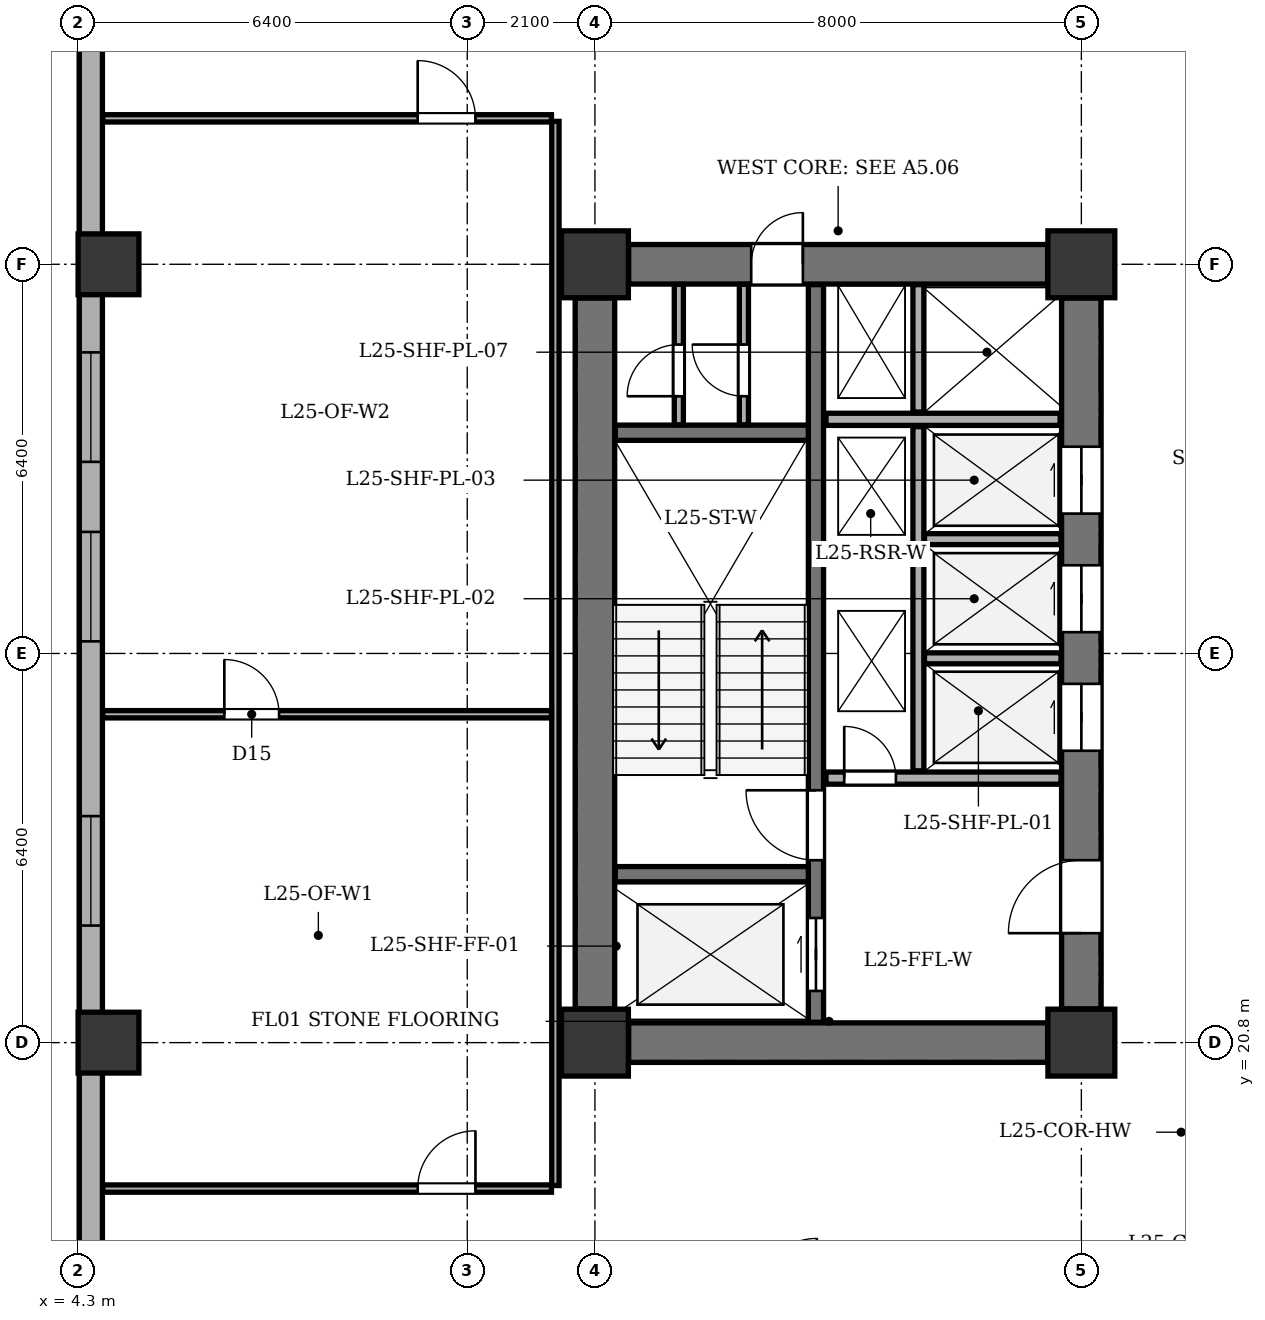
"""IFC4 building model, lengths in metres.
Left out: names, types, materials, properties, quantities, classifications, styles, units other than length and angle.
Written with IfcOpenShell. Run it as: python <this file> out.ifc"""

import sys

from ifc_helpers import new_model, si_unit, direction, frame, frame_2d, origin, origin_2d, place, context, subcontext, project, spatial, rectangle, extrude, element, fill, save


model = new_model("IFC4")
c1 = context("Model", 3, precision=1e-05, world=origin(), true_north=direction((0.0, 1.0)))
c2 = subcontext(c1, "Body", "Model", "MODEL_VIEW")
j1 = project(units=[si_unit("LENGTHUNIT", "METRE"), si_unit("PLANEANGLEUNIT", "RADIAN")], contexts=[c1])
p1 = place(None, origin())
s1 = spatial("IfcSite", under=j1, at=p1, CompositionType="ELEMENT")
p2 = place(p1, origin())
s2 = spatial("IfcBuilding", under=s1, at=p2, CompositionType="ELEMENT")
p3 = place(p2, frame((0.0, 0.0, 102.3)))
s3 = spatial("IfcBuildingStorey", under=s2, at=p3, CompositionType="ELEMENT", Elevation=102.3)
for number, where, z_axis, x_axis in (
    (1, (12.8, 20.8, 0.0), (0.0, 0.0, 1.0), (1.0, 0.0, 0.0)),
    (2, (20.8, 20.8, 0.0), (0.0, 0.0, 1.0), (1.0, 0.0, 0.0)),
    (3, (12.8, 33.6, 0.0), (0.0, 0.0, 1.0), (1.0, 0.0, 0.0)),
    (4, (20.8, 33.6, 0.0), (0.0, 0.0, 1.0), (1.0, 0.0, 0.0)),
):
    element("IfcColumn", number, at=place(p3, frame(where, z_axis=z_axis, x_axis=x_axis)), inside=s3, PredefinedType="COLUMN", context=c2, shape_type="SweptSolid", body=[
        extrude(rectangle(XDim=1.1, YDim=1.1, at=origin_2d()), origin(), (0.0, 0.0, 1.0), 3.9),
    ])
for number, where, z_axis, x_axis in (
    (5, (4.8, 20.8, 0.0), (0.0, 0.0, 1.0), (1.0, 0.0, 0.0)),
    (6, (4.8, 33.6, 0.0), (0.0, 0.0, 1.0), (1.0, 0.0, 0.0)),
):
    element("IfcColumn", number, at=place(p3, frame(where, z_axis=z_axis, x_axis=x_axis)), inside=s3, PredefinedType="COLUMN", context=c2, shape_type="SweptSolid", body=[
        extrude(rectangle(XDim=1.0, YDim=1.0, at=origin_2d()), origin(), (0.0, 0.0, 1.0), 3.9),
    ])
p4 = place(p3, frame((4.51, 12.9, 0.0), z_axis=(0.0, 0.0, 1.0), x_axis=(0.0, 1.0, 0.0)))
e7 = element("IfcWall", 7, at=p4, inside=s3, PredefinedType="STANDARD", context=c2, shape_type="SweptSolid", body=[
    extrude(rectangle(XDim=35.0, YDim=0.38, at=frame_2d((17.5, 0.0))), origin(), (0.0, 0.0, 1.0), 3.135),
])
p5 = place(p4, frame((2.025, 0.0, 0.8)))
e8 = element("IfcOpeningElement", 8, at=p5, cuts=e7, PredefinedType="OPENING", context=c2, shape_type="SweptSolid", body=[
    extrude(rectangle(XDim=1.8, YDim=1.9, at=frame_2d((0.9, 0.95))), frame((0.0, 0.2, 0.0), z_axis=(0.0, -1.0, 0.0), x_axis=(1.0, 0.0, 0.0)), (0.0, 0.0, 1.0), 0.4),
])
p6 = place(p4, frame((9.825, 0.0, 0.8)))
e9 = element("IfcOpeningElement", 9, at=p6, cuts=e7, PredefinedType="OPENING", context=c2, shape_type="SweptSolid", body=[
    extrude(rectangle(XDim=1.8, YDim=1.9, at=frame_2d((0.9, 0.95))), frame((0.0, 0.2, 0.0), z_axis=(0.0, -1.0, 0.0), x_axis=(1.0, 0.0, 0.0)), (0.0, 0.0, 1.0), 0.4),
])
p7 = place(p4, frame((14.499, 0.0, 0.8)))
e10 = element("IfcOpeningElement", 10, at=p7, cuts=e7, PredefinedType="OPENING", context=c2, shape_type="SweptSolid", body=[
    extrude(rectangle(XDim=1.8, YDim=1.9, at=frame_2d((0.9, 0.95))), frame((0.0, 0.2, 0.0), z_axis=(0.0, -1.0, 0.0), x_axis=(1.0, 0.0, 0.0)), (0.0, 0.0, 1.0), 0.4),
])
p8 = place(p4, frame((17.451, 0.0, 0.8)))
e11 = element("IfcOpeningElement", 11, at=p8, cuts=e7, PredefinedType="OPENING", context=c2, shape_type="SweptSolid", body=[
    extrude(rectangle(XDim=1.8, YDim=1.9, at=frame_2d((0.9, 0.95))), frame((0.0, 0.2, 0.0), z_axis=(0.0, -1.0, 0.0), x_axis=(1.0, 0.0, 0.0)), (0.0, 0.0, 1.0), 0.4),
])
p9 = place(p4, frame((25.443, 0.0, 0.8)))
e12 = element("IfcOpeningElement", 12, at=p9, cuts=e7, PredefinedType="OPENING", context=c2, shape_type="SweptSolid", body=[
    extrude(rectangle(XDim=1.8, YDim=1.9, at=frame_2d((0.9, 0.95))), frame((0.0, 0.2, 0.0), z_axis=(0.0, -1.0, 0.0), x_axis=(1.0, 0.0, 0.0)), (0.0, 0.0, 1.0), 0.4),
])
p10 = place(p4, frame((30.207, 0.0, 0.8)))
e13 = element("IfcOpeningElement", 13, at=p10, cuts=e7, PredefinedType="OPENING", context=c2, shape_type="SweptSolid", body=[
    extrude(rectangle(XDim=2.4, YDim=1.9, at=frame_2d((1.2, 0.95))), frame((0.0, 0.2, 0.0), z_axis=(0.0, -1.0, 0.0), x_axis=(1.0, 0.0, 0.0)), (0.0, 0.0, 1.0), 0.4),
])
p11 = place(p3, frame((12.8, 21.355, 0.0), z_axis=(0.0, 0.0, 1.0), x_axis=(0.0, 1.0, 0.0)))
e14 = element("IfcWall", 14, at=p11, inside=s3, PredefinedType="SHEAR", context=c2, shape_type="SweptSolid", body=[
    extrude(rectangle(XDim=11.69, YDim=0.65, at=frame_2d((5.845, 0.0))), origin(), (0.0, 0.0, 1.0), 3.6),
])
p12 = place(p3, frame((13.355, 20.8, 0.0), z_axis=(0.0, 0.0, 1.0), x_axis=(1.0, 0.0, 0.0)))
e15 = element("IfcWall", 15, at=p12, inside=s3, PredefinedType="SHEAR", context=c2, shape_type="SweptSolid", body=[
    extrude(rectangle(XDim=6.89, YDim=0.65, at=frame_2d((3.445, 0.0))), origin(), (0.0, 0.0, 1.0), 3.6),
])
p13 = place(p3, frame((13.355, 33.6, 0.0), z_axis=(0.0, 0.0, 1.0), x_axis=(1.0, 0.0, 0.0)))
e16 = element("IfcWall", 16, at=p13, inside=s3, PredefinedType="SHEAR", context=c2, shape_type="SweptSolid", body=[
    extrude(rectangle(XDim=6.89, YDim=0.65, at=frame_2d((3.445, 0.0))), origin(), (0.0, 0.0, 1.0), 3.6),
])
p14 = place(p13, frame((2.015, 0.0, 0.0)))
e17 = element("IfcOpeningElement", 17, at=p14, cuts=e16, PredefinedType="OPENING", context=c2, shape_type="SweptSolid", body=[
    extrude(rectangle(XDim=0.85, YDim=2.02, at=frame_2d((0.425, 1.01))), frame((0.0, 0.335, 0.0), z_axis=(0.0, -1.0, 0.0), x_axis=(1.0, 0.0, 0.0)), (0.0, 0.0, 1.0), 0.67),
])
p15 = place(p3, frame((20.8, 21.355, 0.0), z_axis=(0.0, 0.0, 1.0), x_axis=(0.0, 1.0, 0.0)))
e18 = element("IfcWall", 18, at=p15, inside=s3, PredefinedType="SHEAR", context=c2, shape_type="SweptSolid", body=[
    extrude(rectangle(XDim=11.69, YDim=0.65, at=frame_2d((5.845, 0.0))), origin(), (0.0, 0.0, 1.0), 3.6),
])
p16 = place(p15, frame((1.245, 0.0, 0.0)))
e19 = element("IfcOpeningElement", 19, at=p16, cuts=e18, PredefinedType="OPENING", context=c2, shape_type="SweptSolid", body=[
    extrude(rectangle(XDim=1.2, YDim=2.15, at=frame_2d((0.6, 1.075))), frame((0.0, 0.335, 0.0), z_axis=(0.0, -1.0, 0.0), x_axis=(1.0, 0.0, 0.0)), (0.0, 0.0, 1.0), 0.67),
])
p17 = place(p15, frame((4.245, 0.0, 0.0)))
e20 = element("IfcOpeningElement", 20, at=p17, cuts=e18, PredefinedType="OPENING", context=c2, shape_type="SweptSolid", body=[
    extrude(rectangle(XDim=1.1, YDim=2.1, at=frame_2d((0.55, 1.05))), frame((0.0, 0.335, 0.0), z_axis=(0.0, -1.0, 0.0), x_axis=(1.0, 0.0, 0.0)), (0.0, 0.0, 1.0), 0.67),
])
p18 = place(p15, frame((6.195, 0.0, 0.0)))
e21 = element("IfcOpeningElement", 21, at=p18, cuts=e18, PredefinedType="OPENING", context=c2, shape_type="SweptSolid", body=[
    extrude(rectangle(XDim=1.1, YDim=2.1, at=frame_2d((0.55, 1.05))), frame((0.0, 0.335, 0.0), z_axis=(0.0, -1.0, 0.0), x_axis=(1.0, 0.0, 0.0)), (0.0, 0.0, 1.0), 0.67),
])
p19 = place(p15, frame((8.145, 0.0, 0.0)))
e22 = element("IfcOpeningElement", 22, at=p19, cuts=e18, PredefinedType="OPENING", context=c2, shape_type="SweptSolid", body=[
    extrude(rectangle(XDim=1.1, YDim=2.1, at=frame_2d((0.55, 1.05))), frame((0.0, 0.335, 0.0), z_axis=(0.0, -1.0, 0.0), x_axis=(1.0, 0.0, 0.0)), (0.0, 0.0, 1.0), 0.67),
])
p20 = place(p3, frame((16.435, 21.135, 0.0), z_axis=(0.0, 0.0, 1.0), x_axis=(0.0, 1.0, 0.0)))
e23 = element("IfcWall", 23, at=p20, inside=s3, PredefinedType="SHEAR", context=c2, shape_type="SweptSolid", body=[
    extrude(rectangle(XDim=12.13, YDim=0.25, at=frame_2d((6.065, 0.0))), origin(), (0.0, 0.0, 1.0), 3.6),
])
p21 = place(p20, frame((0.515, 0.0, 0.0)))
e24 = element("IfcOpeningElement", 24, at=p21, cuts=e23, PredefinedType="OPENING", context=c2, shape_type="SweptSolid", body=[
    extrude(rectangle(XDim=1.2, YDim=2.15, at=frame_2d((0.6, 1.075))), frame((0.0, 0.135, 0.0), z_axis=(0.0, -1.0, 0.0), x_axis=(1.0, 0.0, 0.0)), (0.0, 0.0, 1.0), 0.27),
])
p22 = place(p20, frame((2.665, 0.0, 0.0)))
e25 = element("IfcOpeningElement", 25, at=p22, cuts=e23, PredefinedType="OPENING", context=c2, shape_type="SweptSolid", body=[
    extrude(rectangle(XDim=1.15, YDim=2.15, at=frame_2d((0.575, 1.075))), frame((0.0, 0.135, 0.0), z_axis=(0.0, -1.0, 0.0), x_axis=(1.0, 0.0, 0.0)), (0.0, 0.0, 1.0), 0.27),
])
for number, where, z_axis, x_axis in (
    (26, (13.135, 23.57, 0.0), (0.0, 0.0, 1.0), (1.0, 0.0, 0.0)),
    (27, (13.135, 30.83, 0.0), (0.0, 0.0, 1.0), (1.0, 0.0, 0.0)),
):
    element("IfcWall", number, at=place(p3, frame(where, z_axis=z_axis, x_axis=x_axis)), inside=s3, PredefinedType="SHEAR", context=c2, shape_type="SweptSolid", body=[
        extrude(rectangle(XDim=3.175, YDim=0.25, at=frame_2d((1.587, 0.0))), origin(), (0.0, 0.0, 1.0), 3.6),
    ])
p23 = place(p3, frame((16.6, 25.15, 0.0), z_axis=(0.0, 0.0, 1.0), x_axis=(1.0, 0.0, 0.0)))
e28 = element("IfcWall", 28, at=p23, inside=s3, PredefinedType="SOLIDWALL", context=c2, shape_type="SweptSolid", body=[
    extrude(rectangle(XDim=3.865, YDim=0.2, at=frame_2d((1.933, 0.0))), origin(), (0.0, 0.0, 1.0), 3.6),
])
p24 = place(p23, frame((0.3, 0.0, 0.0)))
e29 = element("IfcOpeningElement", 29, at=p24, cuts=e28, PredefinedType="OPENING", context=c2, shape_type="SweptSolid", body=[
    extrude(rectangle(XDim=0.85, YDim=2.02, at=frame_2d((0.425, 1.01))), frame((0.0, 0.11, 0.0), z_axis=(0.0, -1.0, 0.0), x_axis=(1.0, 0.0, 0.0)), (0.0, 0.0, 1.0), 0.22),
])
p25 = place(p3, frame((16.6, 31.05, 0.0), z_axis=(0.0, 0.0, 1.0), x_axis=(1.0, 0.0, 0.0)))
e30 = element("IfcWall", 30, at=p25, inside=s3, PredefinedType="SOLIDWALL", context=c2, shape_type="SweptSolid", body=[
    extrude(rectangle(XDim=3.85, YDim=0.2, at=frame_2d((1.925, 0.0))), origin(), (0.0, 0.0, 1.0), 3.6),
])
p26 = place(p3, frame((18.12, 25.27, 0.0), z_axis=(0.0, 0.0, 1.0), x_axis=(0.0, 1.0, 0.0)))
e31 = element("IfcWall", 31, at=p26, inside=s3, PredefinedType="PARTITIONING", context=c2, shape_type="SweptSolid", body=[
    extrude(rectangle(XDim=5.66, YDim=0.18, at=frame_2d((2.83, 0.0))), origin(), (0.0, 0.0, 1.0), 3.6),
])
p27 = place(p3, frame((18.12, 31.17, 0.0), z_axis=(0.0, 0.0, 1.0), x_axis=(0.0, 1.0, 0.0)))
e32 = element("IfcWall", 32, at=p27, inside=s3, PredefinedType="PARTITIONING", context=c2, shape_type="SweptSolid", body=[
    extrude(rectangle(XDim=2.095, YDim=0.18, at=frame_2d((1.047, 0.0))), origin(), (0.0, 0.0, 1.0), 3.6),
])
for number, where, z_axis, x_axis in (
    (33, (18.22, 27.12, 0.0), (0.0, 0.0, 1.0), (1.0, 0.0, 0.0)),
    (34, (18.22, 29.08, 0.0), (0.0, 0.0, 1.0), (1.0, 0.0, 0.0)),
):
    element("IfcWall", number, at=place(p3, frame(where, z_axis=z_axis, x_axis=x_axis)), inside=s3, PredefinedType="PARTITIONING", context=c2, shape_type="SweptSolid", body=[
        extrude(rectangle(XDim=2.245, YDim=0.18, at=frame_2d((1.123, 0.0))), origin(), (0.0, 0.0, 1.0), 3.6),
    ])
p28 = place(p3, frame((14.18, 30.96, 0.0), z_axis=(0.0, 0.0, 1.0), x_axis=(0.0, 1.0, 0.0)))
e35 = element("IfcWall", 35, at=p28, inside=s3, PredefinedType="PARTITIONING", context=c2, shape_type="SweptSolid", body=[
    extrude(rectangle(XDim=2.31, YDim=0.15, at=frame_2d((1.155, 0.0))), origin(), (0.0, 0.0, 1.0), 3.6),
])
p29 = place(p28, frame((0.47, 0.0, 0.0)))
e36 = element("IfcOpeningElement", 36, at=p29, cuts=e35, PredefinedType="OPENING", context=c2, shape_type="SweptSolid", body=[
    extrude(rectangle(XDim=0.85, YDim=2.02, at=frame_2d((0.425, 1.01))), frame((0.0, 0.085, 0.0), z_axis=(0.0, -1.0, 0.0), x_axis=(1.0, 0.0, 0.0)), (0.0, 0.0, 1.0), 0.17),
])
p30 = place(p3, frame((15.25, 30.96, 0.0), z_axis=(0.0, 0.0, 1.0), x_axis=(0.0, 1.0, 0.0)))
e37 = element("IfcWall", 37, at=p30, inside=s3, PredefinedType="PARTITIONING", context=c2, shape_type="SweptSolid", body=[
    extrude(rectangle(XDim=2.31, YDim=0.15, at=frame_2d((1.155, 0.0))), origin(), (0.0, 0.0, 1.0), 3.6),
])
p31 = place(p30, frame((0.47, 0.0, 0.0)))
e38 = element("IfcOpeningElement", 38, at=p31, cuts=e37, PredefinedType="OPENING", context=c2, shape_type="SweptSolid", body=[
    extrude(rectangle(XDim=0.85, YDim=2.02, at=frame_2d((0.425, 1.01))), frame((0.0, 0.085, 0.0), z_axis=(0.0, -1.0, 0.0), x_axis=(1.0, 0.0, 0.0)), (0.0, 0.0, 1.0), 0.17),
])
p32 = place(p3, frame((12.15, 18.45, 0.0), z_axis=(0.0, 0.0, 1.0), x_axis=(0.0, 1.0, 0.0)))
e39 = element("IfcWall", 39, at=p32, inside=s3, PredefinedType="PARTITIONING", context=c2, shape_type="SweptSolid", body=[
    extrude(rectangle(XDim=17.5, YDim=0.12, at=frame_2d((8.75, 0.0))), origin(), (0.0, 0.0, 1.0), 3.6),
])
p33 = place(p3, frame((4.705, 18.4, 0.0), z_axis=(0.0, 0.0, 1.0), x_axis=(1.0, 0.0, 0.0)))
e40 = element("IfcWall", 40, at=p33, inside=s3, PredefinedType="PARTITIONING", context=c2, shape_type="SweptSolid", body=[
    extrude(rectangle(XDim=7.38, YDim=0.12, at=frame_2d((3.69, 0.0))), origin(), (0.0, 0.0, 1.0), 3.6),
])
p34 = place(p33, frame((5.18, 0.0, 0.0)))
e41 = element("IfcOpeningElement", 41, at=p34, cuts=e40, PredefinedType="OPENING", context=c2, shape_type="SweptSolid", body=[
    extrude(rectangle(XDim=0.95, YDim=2.1, at=frame_2d((0.475, 1.05))), frame((0.0, 0.07, 0.0), z_axis=(0.0, -1.0, 0.0), x_axis=(1.0, 0.0, 0.0)), (0.0, 0.0, 1.0), 0.14),
])
p35 = place(p3, frame((4.705, 36.0, 0.0), z_axis=(0.0, 0.0, 1.0), x_axis=(1.0, 0.0, 0.0)))
e42 = element("IfcWall", 42, at=p35, inside=s3, PredefinedType="PARTITIONING", context=c2, shape_type="SweptSolid", body=[
    extrude(rectangle(XDim=7.38, YDim=0.12, at=frame_2d((3.69, 0.0))), origin(), (0.0, 0.0, 1.0), 3.6),
])
p36 = place(p35, frame((5.18, 0.0, 0.0)))
e43 = element("IfcOpeningElement", 43, at=p36, cuts=e42, PredefinedType="OPENING", context=c2, shape_type="SweptSolid", body=[
    extrude(rectangle(XDim=0.95, YDim=2.1, at=frame_2d((0.475, 1.05))), frame((0.0, 0.07, 0.0), z_axis=(0.0, -1.0, 0.0), x_axis=(1.0, 0.0, 0.0)), (0.0, 0.0, 1.0), 0.14),
])
p37 = place(p3, frame((4.705, 26.2, 0.0), z_axis=(0.0, 0.0, 1.0), x_axis=(1.0, 0.0, 0.0)))
e44 = element("IfcWall", 44, at=p37, inside=s3, PredefinedType="PARTITIONING", context=c2, shape_type="SweptSolid", body=[
    extrude(rectangle(XDim=7.38, YDim=0.12, at=frame_2d((3.69, 0.0))), origin(), (0.0, 0.0, 1.0), 3.6),
])
p38 = place(p37, frame((2.0, 0.0, 0.0)))
e45 = element("IfcOpeningElement", 45, at=p38, cuts=e44, PredefinedType="OPENING", context=c2, shape_type="SweptSolid", body=[
    extrude(rectangle(XDim=0.9, YDim=2.05, at=frame_2d((0.45, 1.025))), frame((0.0, 0.07, 0.0), z_axis=(0.0, -1.0, 0.0), x_axis=(1.0, 0.0, 0.0)), (0.0, 0.0, 1.0), 0.14),
])
p39 = place(p6, origin())
e46 = element("IfcWindow", 46, at=p39, inside=s3, PartitioningType="SINGLE_PANEL", PredefinedType="WINDOW", context=c2, shape_type="SweptSolid", body=[
    extrude(rectangle(XDim=1.8, YDim=1.9, at=frame_2d((0.9, 0.95))), frame((0.0, -0.01, 0.0), z_axis=(0.0, -1.0, 0.0), x_axis=(1.0, 0.0, 0.0)), (0.0, 0.0, 1.0), 0.06),
])
fill(e9, e46)
p40 = place(p7, origin())
e47 = element("IfcWindow", 47, at=p40, inside=s3, PartitioningType="SINGLE_PANEL", PredefinedType="WINDOW", context=c2, shape_type="SweptSolid", body=[
    extrude(rectangle(XDim=1.8, YDim=1.9, at=frame_2d((0.9, 0.95))), frame((0.0, -0.01, 0.0), z_axis=(0.0, -1.0, 0.0), x_axis=(1.0, 0.0, 0.0)), (0.0, 0.0, 1.0), 0.06),
])
fill(e10, e47)
p41 = place(p8, origin())
e48 = element("IfcWindow", 48, at=p41, inside=s3, PartitioningType="SINGLE_PANEL", PredefinedType="WINDOW", context=c2, shape_type="SweptSolid", body=[
    extrude(rectangle(XDim=1.8, YDim=1.9, at=frame_2d((0.9, 0.95))), frame((0.0, -0.01, 0.0), z_axis=(0.0, -1.0, 0.0), x_axis=(1.0, 0.0, 0.0)), (0.0, 0.0, 1.0), 0.06),
])
fill(e11, e48)
p42 = place(p14, origin())
e49 = element("IfcDoor", 49, at=p42, inside=s3, OperationType="SINGLE_SWING_RIGHT", PredefinedType="DOOR", context=c2, shape_type="SweptSolid", body=[
    extrude(rectangle(XDim=0.85, YDim=2.02, at=frame_2d((0.425, 1.01))), frame((0.0, 0.025, 0.0), z_axis=(0.0, -1.0, 0.0), x_axis=(1.0, 0.0, 0.0)), (0.0, 0.0, 1.0), 0.05),
])
fill(e17, e49)
p43 = place(p16, origin())
e50 = element("IfcDoor", 50, at=p43, inside=s3, OperationType="SINGLE_SWING_LEFT", PredefinedType="DOOR", context=c2, shape_type="SweptSolid", body=[
    extrude(rectangle(XDim=1.2, YDim=2.15, at=frame_2d((0.6, 1.075))), frame((0.0, 0.025, 0.0), z_axis=(0.0, -1.0, 0.0), x_axis=(1.0, 0.0, 0.0)), (0.0, 0.0, 1.0), 0.05),
])
fill(e19, e50)
p44 = place(p17, origin())
e51 = element("IfcDoor", 51, at=p44, inside=s3, OperationType="DOUBLE_DOOR_SLIDING", PredefinedType="DOOR", context=c2, shape_type="SweptSolid", body=[
    extrude(rectangle(XDim=1.1, YDim=2.1, at=frame_2d((0.55, 1.05))), frame((0.0, 0.025, 0.0), z_axis=(0.0, -1.0, 0.0), x_axis=(1.0, 0.0, 0.0)), (0.0, 0.0, 1.0), 0.05),
])
fill(e20, e51)
p45 = place(p18, origin())
e52 = element("IfcDoor", 52, at=p45, inside=s3, OperationType="DOUBLE_DOOR_SLIDING", PredefinedType="DOOR", context=c2, shape_type="SweptSolid", body=[
    extrude(rectangle(XDim=1.1, YDim=2.1, at=frame_2d((0.55, 1.05))), frame((0.0, 0.025, 0.0), z_axis=(0.0, -1.0, 0.0), x_axis=(1.0, 0.0, 0.0)), (0.0, 0.0, 1.0), 0.05),
])
fill(e21, e52)
p46 = place(p19, origin())
e53 = element("IfcDoor", 53, at=p46, inside=s3, OperationType="DOUBLE_DOOR_SLIDING", PredefinedType="DOOR", context=c2, shape_type="SweptSolid", body=[
    extrude(rectangle(XDim=1.1, YDim=2.1, at=frame_2d((0.55, 1.05))), frame((0.0, 0.025, 0.0), z_axis=(0.0, -1.0, 0.0), x_axis=(1.0, 0.0, 0.0)), (0.0, 0.0, 1.0), 0.05),
])
fill(e22, e53)
p47 = place(p21, origin())
e54 = element("IfcDoor", 54, at=p47, inside=s3, OperationType="DOUBLE_DOOR_SLIDING", PredefinedType="DOOR", context=c2, shape_type="SweptSolid", body=[
    extrude(rectangle(XDim=1.2, YDim=2.15, at=frame_2d((0.6, 1.075))), frame((0.0, 0.025, 0.0), z_axis=(0.0, -1.0, 0.0), x_axis=(1.0, 0.0, 0.0)), (0.0, 0.0, 1.0), 0.05),
])
fill(e24, e54)
p48 = place(p22, origin())
e55 = element("IfcDoor", 55, at=p48, inside=s3, OperationType="SINGLE_SWING_RIGHT", PredefinedType="DOOR", context=c2, shape_type="SweptSolid", body=[
    extrude(rectangle(XDim=1.15, YDim=2.15, at=frame_2d((0.575, 1.075))), frame((0.0, 0.025, 0.0), z_axis=(0.0, -1.0, 0.0), x_axis=(1.0, 0.0, 0.0)), (0.0, 0.0, 1.0), 0.05),
])
fill(e25, e55)
p49 = place(p24, origin())
e56 = element("IfcDoor", 56, at=p49, inside=s3, OperationType="SINGLE_SWING_LEFT", PredefinedType="DOOR", context=c2, shape_type="SweptSolid", body=[
    extrude(rectangle(XDim=0.85, YDim=2.02, at=frame_2d((0.425, 1.01))), frame((0.0, 0.025, 0.0), z_axis=(0.0, -1.0, 0.0), x_axis=(1.0, 0.0, 0.0)), (0.0, 0.0, 1.0), 0.05),
])
fill(e29, e56)
p50 = place(p29, origin())
e57 = element("IfcDoor", 57, at=p50, inside=s3, OperationType="SINGLE_SWING_LEFT", PredefinedType="DOOR", context=c2, shape_type="SweptSolid", body=[
    extrude(rectangle(XDim=0.85, YDim=2.02, at=frame_2d((0.425, 1.01))), frame((0.0, 0.025, 0.0), z_axis=(0.0, -1.0, 0.0), x_axis=(1.0, 0.0, 0.0)), (0.0, 0.0, 1.0), 0.05),
])
fill(e36, e57)
p51 = place(p31, origin())
e58 = element("IfcDoor", 58, at=p51, inside=s3, OperationType="SINGLE_SWING_RIGHT", PredefinedType="DOOR", context=c2, shape_type="SweptSolid", body=[
    extrude(rectangle(XDim=0.85, YDim=2.02, at=frame_2d((0.425, 1.01))), frame((0.0, 0.025, 0.0), z_axis=(0.0, -1.0, 0.0), x_axis=(1.0, 0.0, 0.0)), (0.0, 0.0, 1.0), 0.05),
])
fill(e38, e58)
p52 = place(p38, origin())
e59 = element("IfcDoor", 59, at=p52, inside=s3, OperationType="SINGLE_SWING_LEFT", PredefinedType="DOOR", context=c2, shape_type="SweptSolid", body=[
    extrude(rectangle(XDim=0.9, YDim=2.05, at=frame_2d((0.45, 1.025))), frame((0.0, 0.025, 0.0), z_axis=(0.0, -1.0, 0.0), x_axis=(1.0, 0.0, 0.0)), (0.0, 0.0, 1.0), 0.05),
])
fill(e45, e59)
p53 = place(p34, origin())
e60 = element("IfcDoor", 60, at=p53, inside=s3, OperationType="SINGLE_SWING_RIGHT", PredefinedType="DOOR", context=c2, shape_type="SweptSolid", body=[
    extrude(rectangle(XDim=0.95, YDim=2.1, at=frame_2d((0.475, 1.05))), frame((0.0, 0.025, 0.0), z_axis=(0.0, -1.0, 0.0), x_axis=(1.0, 0.0, 0.0)), (0.0, 0.0, 1.0), 0.05),
])
fill(e41, e60)
p54 = place(p36, origin())
e61 = element("IfcDoor", 61, at=p54, inside=s3, OperationType="SINGLE_SWING_LEFT", PredefinedType="DOOR", context=c2, shape_type="SweptSolid", body=[
    extrude(rectangle(XDim=0.95, YDim=2.1, at=frame_2d((0.475, 1.05))), frame((0.0, 0.025, 0.0), z_axis=(0.0, -1.0, 0.0), x_axis=(1.0, 0.0, 0.0)), (0.0, 0.0, 1.0), 0.05),
])
fill(e43, e61)
save(model, sys.argv[1])
